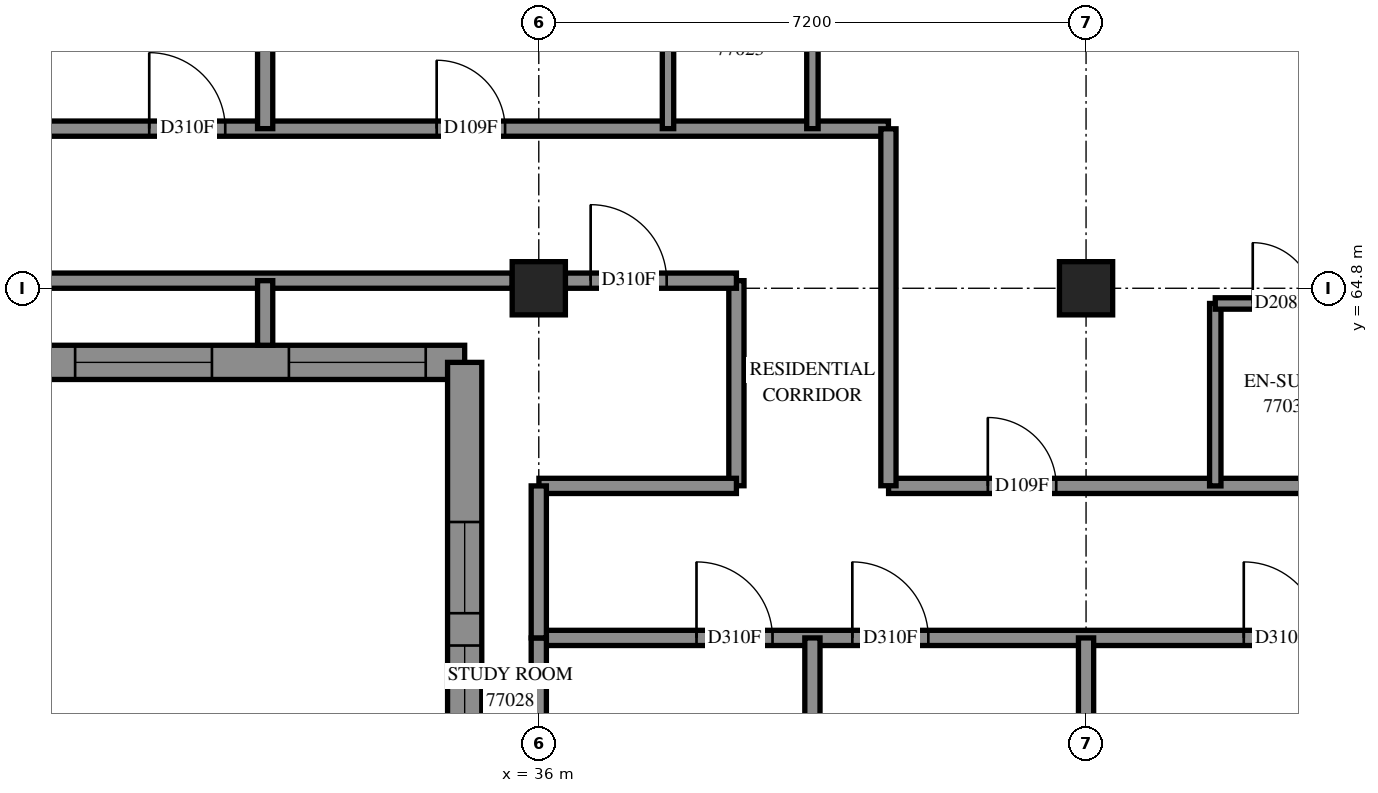
"""IFC4 building model, lengths in metres.
Left out: names, types, materials, properties, quantities, classifications, styles, units other than length and angle.
Written with IfcOpenShell. Run it as: python <this file> out.ifc"""

import sys

from ifc_helpers import new_model, si_unit, direction, frame, frame_2d, origin, origin_2d, place, context, subcontext, project, spatial, polyline, rectangle, outline, extrude, element, fill, save


model = new_model("IFC4")
c1 = context("Model", 3, precision=1e-05, world=origin(), true_north=direction((0.0, 1.0)))
c2 = subcontext(c1, "Body", "Model", "MODEL_VIEW")
j1 = project(units=[si_unit("LENGTHUNIT", "METRE"), si_unit("PLANEANGLEUNIT", "RADIAN")], contexts=[c1])
p1 = place(None, origin())
s1 = spatial("IfcSite", under=j1, at=p1, CompositionType="ELEMENT")
p2 = place(p1, origin())
s2 = spatial("IfcBuilding", under=s1, at=p2, CompositionType="ELEMENT")
p3 = place(p2, frame((0.0, 0.0, 281.2)))
s3 = spatial("IfcBuildingStorey", under=s2, at=p3, CompositionType="ELEMENT", Elevation=281.2)
for number, where, z_axis, x_axis in (
    (1, (36.0, 64.8, 0.0), (0.0, 0.0, 1.0), (1.0, 0.0, 0.0)),
    (2, (43.2, 64.8, 0.0), (0.0, 0.0, 1.0), (1.0, 0.0, 0.0)),
):
    element("IfcColumn", number, at=place(p3, frame(where, z_axis=z_axis, x_axis=x_axis)), inside=s3, PredefinedType="COLUMN", context=c2, shape_type="SweptSolid", body=[
        extrude(rectangle(XDim=0.7, YDim=0.7, at=origin_2d()), origin(), (0.0, 0.0, 1.0), 3.1),
    ])
p4 = place(p3, frame((26.592, 63.825, 0.0), z_axis=(0.0, 0.0, 1.0), x_axis=(1.0, 0.0, 0.0)))
e3 = element("IfcWall", 3, at=p4, inside=s3, PredefinedType="SOLIDWALL", context=c2, shape_type="SweptSolid", body=[
    extrude(outline(polyline([(-0.225, -0.225), (8.208, -0.225), (8.658, 0.225), (0.225, 0.225), (-0.225, -0.225)])), origin(), (0.0, 0.0, 1.0), 2.6),
])
p5 = place(p4, frame((3.308, 0.0, 0.6)))
e4 = element("IfcOpeningElement", 4, at=p5, cuts=e3, PredefinedType="OPENING", context=c2, shape_type="SweptSolid", body=[
    extrude(rectangle(XDim=1.8, YDim=1.9, at=frame_2d((0.9, 0.95))), frame((0.0, 0.235, 0.0), z_axis=(0.0, -1.0, 0.0), x_axis=(1.0, 0.0, 0.0)), (0.0, 0.0, 1.0), 0.47),
])
p6 = place(p4, frame((6.12, 0.0, 0.6)))
e5 = element("IfcOpeningElement", 5, at=p6, cuts=e3, PredefinedType="OPENING", context=c2, shape_type="SweptSolid", body=[
    extrude(rectangle(XDim=1.8, YDim=1.9, at=frame_2d((0.9, 0.95))), frame((0.0, 0.235, 0.0), z_axis=(0.0, -1.0, 0.0), x_axis=(1.0, 0.0, 0.0)), (0.0, 0.0, 1.0), 0.47),
])
p7 = place(p4, frame((0.717, 0.0, 0.6)))
e6 = element("IfcOpeningElement", 6, at=p7, cuts=e3, PredefinedType="OPENING", context=c2, shape_type="SweptSolid", body=[
    extrude(rectangle(XDim=1.2, YDim=1.9, at=frame_2d((0.6, 0.95))), frame((0.0, 0.235, 0.0), z_axis=(0.0, -1.0, 0.0), x_axis=(1.0, 0.0, 0.0)), (0.0, 0.0, 1.0), 0.47),
])
p8 = place(p3, frame((35.025, 63.825, 0.0), z_axis=(0.0, 0.0, 1.0), x_axis=(0.0, -1.0, 0.0)))
e7 = element("IfcWall", 7, at=p8, inside=s3, PredefinedType="SOLIDWALL", context=c2, shape_type="SweptSolid", body=[
    extrude(outline(polyline([(0.225, -0.225), (7.425, -0.225), (6.975, 0.225), (-0.225, 0.225), (0.225, -0.225)])), origin(), (0.0, 0.0, 1.0), 2.6),
])
p9 = place(p8, frame((3.725, 0.0, 0.6)))
e8 = element("IfcOpeningElement", 8, at=p9, cuts=e7, PredefinedType="OPENING", context=c2, shape_type="SweptSolid", body=[
    extrude(rectangle(XDim=1.8, YDim=1.9, at=frame_2d((0.9, 0.95))), frame((0.0, 0.235, 0.0), z_axis=(0.0, -1.0, 0.0), x_axis=(1.0, 0.0, 0.0)), (0.0, 0.0, 1.0), 0.47),
])
p10 = place(p8, frame((2.1, 0.0, 0.6)))
e9 = element("IfcOpeningElement", 9, at=p10, cuts=e7, PredefinedType="OPENING", context=c2, shape_type="SweptSolid", body=[
    extrude(rectangle(XDim=1.2, YDim=1.9, at=frame_2d((0.6, 0.95))), frame((0.0, 0.235, 0.0), z_axis=(0.0, -1.0, 0.0), x_axis=(1.0, 0.0, 0.0)), (0.0, 0.0, 1.0), 0.47),
])
p11 = place(p3, frame((36.0, 60.2, 0.0), z_axis=(0.0, 0.0, 1.0), x_axis=(1.0, 0.0, 0.0)))
e10 = element("IfcWall", 10, at=p11, inside=s3, PredefinedType="PARTITIONING", context=c2, shape_type="SweptSolid", body=[
    extrude(rectangle(XDim=17.0, YDim=0.2, at=frame_2d((8.5, 0.0))), origin(), (0.0, 0.0, 1.0), 3.1),
])
p12 = place(p11, frame((15.802, 0.0, 0.0)))
e11 = element("IfcOpeningElement", 11, at=p12, cuts=e10, PredefinedType="OPENING", context=c2, shape_type="SweptSolid", body=[
    extrude(rectangle(XDim=1.0, YDim=2.1, at=frame_2d((0.5, 1.05))), frame((0.0, 0.11, 0.0), z_axis=(0.0, -1.0, 0.0), x_axis=(1.0, 0.0, 0.0)), (0.0, 0.0, 1.0), 0.22),
])
p13 = place(p11, frame((2.075, 0.0, 0.0)))
e12 = element("IfcOpeningElement", 12, at=p13, cuts=e10, PredefinedType="OPENING", context=c2, shape_type="SweptSolid", body=[
    extrude(rectangle(XDim=1.0, YDim=2.1, at=frame_2d((0.5, 1.05))), frame((0.0, 0.11, 0.0), z_axis=(0.0, -1.0, 0.0), x_axis=(1.0, 0.0, 0.0)), (0.0, 0.0, 1.0), 0.22),
])
p14 = place(p11, frame((4.125, 0.0, 0.0)))
e13 = element("IfcOpeningElement", 13, at=p14, cuts=e10, PredefinedType="OPENING", context=c2, shape_type="SweptSolid", body=[
    extrude(rectangle(XDim=1.0, YDim=2.1, at=frame_2d((0.5, 1.05))), frame((0.0, 0.11, 0.0), z_axis=(0.0, -1.0, 0.0), x_axis=(1.0, 0.0, 0.0)), (0.0, 0.0, 1.0), 0.22),
])
p15 = place(p11, frame((9.275, 0.0, 0.0)))
e14 = element("IfcOpeningElement", 14, at=p15, cuts=e10, PredefinedType="OPENING", context=c2, shape_type="SweptSolid", body=[
    extrude(rectangle(XDim=1.0, YDim=2.1, at=frame_2d((0.5, 1.05))), frame((0.0, 0.11, 0.0), z_axis=(0.0, -1.0, 0.0), x_axis=(1.0, 0.0, 0.0)), (0.0, 0.0, 1.0), 0.22),
])
p16 = place(p11, frame((11.48, 0.0, 0.0)))
e15 = element("IfcOpeningElement", 15, at=p16, cuts=e10, PredefinedType="OPENING", context=c2, shape_type="SweptSolid", body=[
    extrude(rectangle(XDim=1.0, YDim=2.1, at=frame_2d((0.5, 1.05))), frame((0.0, 0.11, 0.0), z_axis=(0.0, -1.0, 0.0), x_axis=(1.0, 0.0, 0.0)), (0.0, 0.0, 1.0), 0.22),
])
p17 = place(p3, frame((28.8, 66.9, 0.0), z_axis=(0.0, 0.0, 1.0), x_axis=(1.0, 0.0, 0.0)))
e16 = element("IfcWall", 16, at=p17, inside=s3, PredefinedType="PARTITIONING", context=c2, shape_type="SweptSolid", body=[
    extrude(rectangle(XDim=11.8, YDim=0.2, at=frame_2d((5.9, 0.0))), origin(), (0.0, 0.0, 1.0), 3.1),
])
p18 = place(p17, frame((2.075, 0.0, 0.0)))
e17 = element("IfcOpeningElement", 17, at=p18, cuts=e16, PredefinedType="OPENING", context=c2, shape_type="SweptSolid", body=[
    extrude(rectangle(XDim=1.0, YDim=2.1, at=frame_2d((0.5, 1.05))), frame((0.0, 0.11, 0.0), z_axis=(0.0, -1.0, 0.0), x_axis=(1.0, 0.0, 0.0)), (0.0, 0.0, 1.0), 0.22),
])
p19 = place(p17, frame((5.857, 0.0, 0.0)))
e18 = element("IfcOpeningElement", 18, at=p19, cuts=e16, PredefinedType="OPENING", context=c2, shape_type="SweptSolid", body=[
    extrude(rectangle(XDim=0.9, YDim=2.1, at=frame_2d((0.45, 1.05))), frame((0.0, 0.11, 0.0), z_axis=(0.0, -1.0, 0.0), x_axis=(1.0, 0.0, 0.0)), (0.0, 0.0, 1.0), 0.22),
])
p20 = place(p3, frame((40.602, 62.2, 0.0), z_axis=(0.0, 0.0, 1.0), x_axis=(1.0, 0.0, 0.0)))
e19 = element("IfcWall", 19, at=p20, inside=s3, PredefinedType="PARTITIONING", context=c2, shape_type="SweptSolid", body=[
    extrude(rectangle(XDim=9.798, YDim=0.2, at=frame_2d((4.899, 0.0))), origin(), (0.0, 0.0, 1.0), 3.1),
])
p21 = place(p20, frame((1.306, 0.0, 0.0)))
e20 = element("IfcOpeningElement", 20, at=p21, cuts=e19, PredefinedType="OPENING", context=c2, shape_type="SweptSolid", body=[
    extrude(rectangle(XDim=0.9, YDim=2.1, at=frame_2d((0.45, 1.05))), frame((0.0, 0.11, 0.0), z_axis=(0.0, -1.0, 0.0), x_axis=(1.0, 0.0, 0.0)), (0.0, 0.0, 1.0), 0.22),
])
p22 = place(p20, frame((6.711, 0.0, 0.0)))
e21 = element("IfcOpeningElement", 21, at=p22, cuts=e19, PredefinedType="OPENING", context=c2, shape_type="SweptSolid", body=[
    extrude(rectangle(XDim=1.0, YDim=2.1, at=frame_2d((0.5, 1.05))), frame((0.0, 0.11, 0.0), z_axis=(0.0, -1.0, 0.0), x_axis=(1.0, 0.0, 0.0)), (0.0, 0.0, 1.0), 0.22),
])
p23 = place(p3, frame((29.15, 64.9, 0.0), z_axis=(0.0, 0.0, 1.0), x_axis=(1.0, 0.0, 0.0)))
e22 = element("IfcWall", 22, at=p23, inside=s3, PredefinedType="PARTITIONING", context=c2, shape_type="SweptSolid", body=[
    extrude(rectangle(XDim=6.5, YDim=0.2, at=frame_2d((3.25, 0.0))), origin(), (0.0, 0.0, 1.0), 2.6),
])
p24 = place(p3, frame((32.4, 66.9, 0.0), z_axis=(0.0, 0.0, 1.0), x_axis=(0.0, 1.0, 0.0)))
e23 = element("IfcWall", 23, at=p24, inside=s3, PredefinedType="PARTITIONING", context=c2, shape_type="SweptSolid", body=[
    extrude(rectangle(XDim=5.85, YDim=0.2, at=frame_2d((2.925, 0.0))), origin(), (0.0, 0.0, 1.0), 3.1),
])
p25 = place(p3, frame((40.6, 62.202, 0.0), z_axis=(0.0, 0.0, 1.0), x_axis=(0.0, 1.0, 0.0)))
e24 = element("IfcWall", 24, at=p25, inside=s3, PredefinedType="PARTITIONING", context=c2, shape_type="SweptSolid", body=[
    extrude(rectangle(XDim=4.696, YDim=0.2, at=frame_2d((2.348, 0.0))), origin(), (0.0, 0.0, 1.0), 3.1),
])
p26 = place(p3, frame((39.6, 56.85, 0.0), z_axis=(0.0, 0.0, 1.0), x_axis=(0.0, 1.0, 0.0)))
e25 = element("IfcWall", 25, at=p26, inside=s3, PredefinedType="PARTITIONING", context=c2, shape_type="SweptSolid", body=[
    extrude(rectangle(XDim=3.35, YDim=0.2, at=frame_2d((1.675, 0.0))), origin(), (0.0, 0.0, 1.0), 3.1),
])
p27 = place(p3, frame((38.6, 62.202, 0.0), z_axis=(0.0, 0.0, 1.0), x_axis=(0.0, 1.0, 0.0)))
e26 = element("IfcWall", 26, at=p27, inside=s3, PredefinedType="PARTITIONING", context=c2, shape_type="SweptSolid", body=[
    extrude(rectangle(XDim=2.698, YDim=0.2, at=frame_2d((1.349, 0.0))), origin(), (0.0, 0.0, 1.0), 3.1),
])
p28 = place(p3, frame((36.002, 62.2, 0.0), z_axis=(0.0, 0.0, 1.0), x_axis=(1.0, 0.0, 0.0)))
e27 = element("IfcWall", 27, at=p28, inside=s3, PredefinedType="PARTITIONING", context=c2, shape_type="SweptSolid", body=[
    extrude(rectangle(XDim=2.598, YDim=0.2, at=frame_2d((1.299, 0.0))), origin(), (0.0, 0.0, 1.0), 3.1),
])
for number, where, z_axis, x_axis in (
    (28, (37.7, 66.9, 0.0), (0.0, 0.0, 1.0), (0.0, 1.0, 0.0)),
    (29, (39.6, 66.9, 0.0), (0.0, 0.0, 1.0), (0.0, 1.0, 0.0)),
    (30, (44.9, 62.2, 0.0), (0.0, 0.0, 1.0), (0.0, 1.0, 0.0)),
):
    element("IfcWall", number, at=place(p3, frame(where, z_axis=z_axis, x_axis=x_axis)), inside=s3, PredefinedType="PARTITIONING", context=c2, shape_type="SweptSolid", body=[
        extrude(rectangle(XDim=2.4, YDim=0.15, at=frame_2d((1.2, 0.0))), origin(), (0.0, 0.0, 1.0), 3.1),
    ])
p29 = place(p3, frame((36.35, 64.9, 0.0), z_axis=(0.0, 0.0, 1.0), x_axis=(1.0, 0.0, 0.0)))
e31 = element("IfcWall", 31, at=p29, inside=s3, PredefinedType="PARTITIONING", context=c2, shape_type="SweptSolid", body=[
    extrude(rectangle(XDim=2.25, YDim=0.2, at=frame_2d((1.125, 0.0))), origin(), (0.0, 0.0, 1.0), 3.1),
])
p30 = place(p29, frame((0.333, 0.0, 0.0)))
e32 = element("IfcOpeningElement", 32, at=p30, cuts=e31, PredefinedType="OPENING", context=c2, shape_type="SweptSolid", body=[
    extrude(rectangle(XDim=1.0, YDim=2.1, at=frame_2d((0.5, 1.05))), frame((0.0, 0.11, 0.0), z_axis=(0.0, -1.0, 0.0), x_axis=(1.0, 0.0, 0.0)), (0.0, 0.0, 1.0), 0.22),
])
p31 = place(p3, frame((36.0, 57.95, 0.0), z_axis=(0.0, 0.0, 1.0), x_axis=(0.0, 1.0, 0.0)))
e33 = element("IfcWall", 33, at=p31, inside=s3, PredefinedType="PARTITIONING", context=c2, shape_type="SweptSolid", body=[
    extrude(rectangle(XDim=2.25, YDim=0.2, at=frame_2d((1.125, 0.0))), origin(), (0.0, 0.0, 1.0), 2.6),
])
p32 = place(p3, frame((43.2, 57.95, 0.0), z_axis=(0.0, 0.0, 1.0), x_axis=(0.0, 1.0, 0.0)))
e34 = element("IfcWall", 34, at=p32, inside=s3, PredefinedType="PARTITIONING", context=c2, shape_type="SweptSolid", body=[
    extrude(rectangle(XDim=2.25, YDim=0.2, at=frame_2d((1.125, 0.0))), origin(), (0.0, 0.0, 1.0), 3.1),
])
p33 = place(p3, frame((36.0, 60.2, 0.0), z_axis=(0.0, 0.0, 1.0), x_axis=(0.0, 1.0, 0.0)))
e35 = element("IfcWall", 35, at=p33, inside=s3, PredefinedType="PARTITIONING", context=c2, shape_type="SweptSolid", body=[
    extrude(rectangle(XDim=2.0, YDim=0.2, at=frame_2d((1.0, 0.0))), origin(), (0.0, 0.0, 1.0), 2.6),
])
p34 = place(p3, frame((44.9, 64.6, 0.0), z_axis=(0.0, 0.0, 1.0), x_axis=(1.0, 0.0, 0.0)))
e36 = element("IfcWall", 36, at=p34, inside=s3, PredefinedType="PARTITIONING", context=c2, shape_type="SweptSolid", body=[
    extrude(rectangle(XDim=1.9, YDim=0.15, at=frame_2d((0.95, 0.0))), origin(), (0.0, 0.0, 1.0), 3.1),
])
p35 = place(p34, frame((0.493, 0.0, 0.0)))
e37 = element("IfcOpeningElement", 37, at=p35, cuts=e36, PredefinedType="OPENING", context=c2, shape_type="SweptSolid", body=[
    extrude(rectangle(XDim=0.8, YDim=2.1, at=frame_2d((0.4, 1.05))), frame((0.0, 0.085, 0.0), z_axis=(0.0, -1.0, 0.0), x_axis=(1.0, 0.0, 0.0)), (0.0, 0.0, 1.0), 0.17),
])
p36 = place(p3, frame((32.4, 64.05, 0.0), z_axis=(0.0, 0.0, 1.0), x_axis=(0.0, 1.0, 0.0)))
e38 = element("IfcWall", 38, at=p36, inside=s3, PredefinedType="PARTITIONING", context=c2, shape_type="SweptSolid", body=[
    extrude(rectangle(XDim=0.85, YDim=0.2, at=frame_2d((0.425, 0.0))), origin(), (0.0, 0.0, 1.0), 3.1),
])
p37 = place(p5, origin())
e39 = element("IfcWindow", 39, at=p37, inside=s3, PartitioningType="SINGLE_PANEL", PredefinedType="WINDOW", context=c2, shape_type="SweptSolid", body=[
    extrude(rectangle(XDim=1.8, YDim=1.9, at=frame_2d((0.9, 0.95))), frame((0.0, 0.205, 0.0), z_axis=(0.0, -1.0, 0.0), x_axis=(1.0, 0.0, 0.0)), (0.0, 0.0, 1.0), 0.06),
])
fill(e4, e39)
p38 = place(p6, origin())
e40 = element("IfcWindow", 40, at=p38, inside=s3, PartitioningType="SINGLE_PANEL", PredefinedType="WINDOW", context=c2, shape_type="SweptSolid", body=[
    extrude(rectangle(XDim=1.8, YDim=1.9, at=frame_2d((0.9, 0.95))), frame((0.0, 0.205, 0.0), z_axis=(0.0, -1.0, 0.0), x_axis=(1.0, 0.0, 0.0)), (0.0, 0.0, 1.0), 0.06),
])
fill(e5, e40)
p39 = place(p9, origin())
e41 = element("IfcWindow", 41, at=p39, inside=s3, PartitioningType="SINGLE_PANEL", PredefinedType="WINDOW", context=c2, shape_type="SweptSolid", body=[
    extrude(rectangle(XDim=1.8, YDim=1.9, at=frame_2d((0.9, 0.95))), frame((0.0, 0.205, 0.0), z_axis=(0.0, -1.0, 0.0), x_axis=(1.0, 0.0, 0.0)), (0.0, 0.0, 1.0), 0.06),
])
fill(e8, e41)
p40 = place(p18, origin())
e42 = element("IfcDoor", 42, at=p40, inside=s3, OperationType="SINGLE_SWING_RIGHT", PredefinedType="DOOR", context=c2, shape_type="SweptSolid", body=[
    extrude(rectangle(XDim=1.0, YDim=2.1, at=frame_2d((0.5, 1.05))), frame((0.0, 0.025, 0.0), z_axis=(0.0, -1.0, 0.0), x_axis=(1.0, 0.0, 0.0)), (0.0, 0.0, 1.0), 0.05),
])
fill(e17, e42)
p41 = place(p19, origin())
e43 = element("IfcDoor", 43, at=p41, inside=s3, OperationType="SINGLE_SWING_LEFT", PredefinedType="DOOR", context=c2, shape_type="SweptSolid", body=[
    extrude(rectangle(XDim=0.9, YDim=2.1, at=frame_2d((0.45, 1.05))), frame((0.0, 0.025, 0.0), z_axis=(0.0, -1.0, 0.0), x_axis=(1.0, 0.0, 0.0)), (0.0, 0.0, 1.0), 0.05),
])
fill(e18, e43)
p42 = place(p30, origin())
e44 = element("IfcDoor", 44, at=p42, inside=s3, OperationType="SINGLE_SWING_RIGHT", PredefinedType="DOOR", context=c2, shape_type="SweptSolid", body=[
    extrude(rectangle(XDim=1.0, YDim=2.1, at=frame_2d((0.5, 1.05))), frame((0.0, 0.025, 0.0), z_axis=(0.0, -1.0, 0.0), x_axis=(1.0, 0.0, 0.0)), (0.0, 0.0, 1.0), 0.05),
])
fill(e32, e44)
p43 = place(p13, origin())
e45 = element("IfcDoor", 45, at=p43, inside=s3, OperationType="SINGLE_SWING_LEFT", PredefinedType="DOOR", context=c2, shape_type="SweptSolid", body=[
    extrude(rectangle(XDim=1.0, YDim=2.1, at=frame_2d((0.5, 1.05))), frame((0.0, 0.025, 0.0), z_axis=(0.0, -1.0, 0.0), x_axis=(1.0, 0.0, 0.0)), (0.0, 0.0, 1.0), 0.05),
])
fill(e12, e45)
p44 = place(p14, origin())
e46 = element("IfcDoor", 46, at=p44, inside=s3, OperationType="SINGLE_SWING_RIGHT", PredefinedType="DOOR", context=c2, shape_type="SweptSolid", body=[
    extrude(rectangle(XDim=1.0, YDim=2.1, at=frame_2d((0.5, 1.05))), frame((0.0, 0.025, 0.0), z_axis=(0.0, -1.0, 0.0), x_axis=(1.0, 0.0, 0.0)), (0.0, 0.0, 1.0), 0.05),
])
fill(e13, e46)
p45 = place(p15, origin())
e47 = element("IfcDoor", 47, at=p45, inside=s3, OperationType="SINGLE_SWING_LEFT", PredefinedType="DOOR", context=c2, shape_type="SweptSolid", body=[
    extrude(rectangle(XDim=1.0, YDim=2.1, at=frame_2d((0.5, 1.05))), frame((0.0, 0.025, 0.0), z_axis=(0.0, -1.0, 0.0), x_axis=(1.0, 0.0, 0.0)), (0.0, 0.0, 1.0), 0.05),
])
fill(e14, e47)
p46 = place(p21, origin())
e48 = element("IfcDoor", 48, at=p46, inside=s3, OperationType="SINGLE_SWING_LEFT", PredefinedType="DOOR", context=c2, shape_type="SweptSolid", body=[
    extrude(rectangle(XDim=0.9, YDim=2.1, at=frame_2d((0.45, 1.05))), frame((0.0, 0.025, 0.0), z_axis=(0.0, -1.0, 0.0), x_axis=(1.0, 0.0, 0.0)), (0.0, 0.0, 1.0), 0.05),
])
fill(e20, e48)
p47 = place(p35, origin())
e49 = element("IfcDoor", 49, at=p47, inside=s3, OperationType="SINGLE_SWING_RIGHT", PredefinedType="DOOR", context=c2, shape_type="SweptSolid", body=[
    extrude(rectangle(XDim=0.8, YDim=2.1, at=frame_2d((0.4, 1.05))), frame((0.0, 0.025, 0.0), z_axis=(0.0, -1.0, 0.0), x_axis=(1.0, 0.0, 0.0)), (0.0, 0.0, 1.0), 0.05),
])
fill(e37, e49)
p48 = place(p10, origin())
e50 = element("IfcWindow", 50, at=p48, inside=s3, PartitioningType="SINGLE_PANEL", PredefinedType="WINDOW", context=c2, shape_type="SweptSolid", body=[
    extrude(rectangle(XDim=1.2, YDim=1.9, at=frame_2d((0.6, 0.95))), frame((0.0, 0.205, 0.0), z_axis=(0.0, -1.0, 0.0), x_axis=(1.0, 0.0, 0.0)), (0.0, 0.0, 1.0), 0.06),
])
fill(e9, e50)
save(model, sys.argv[1])
